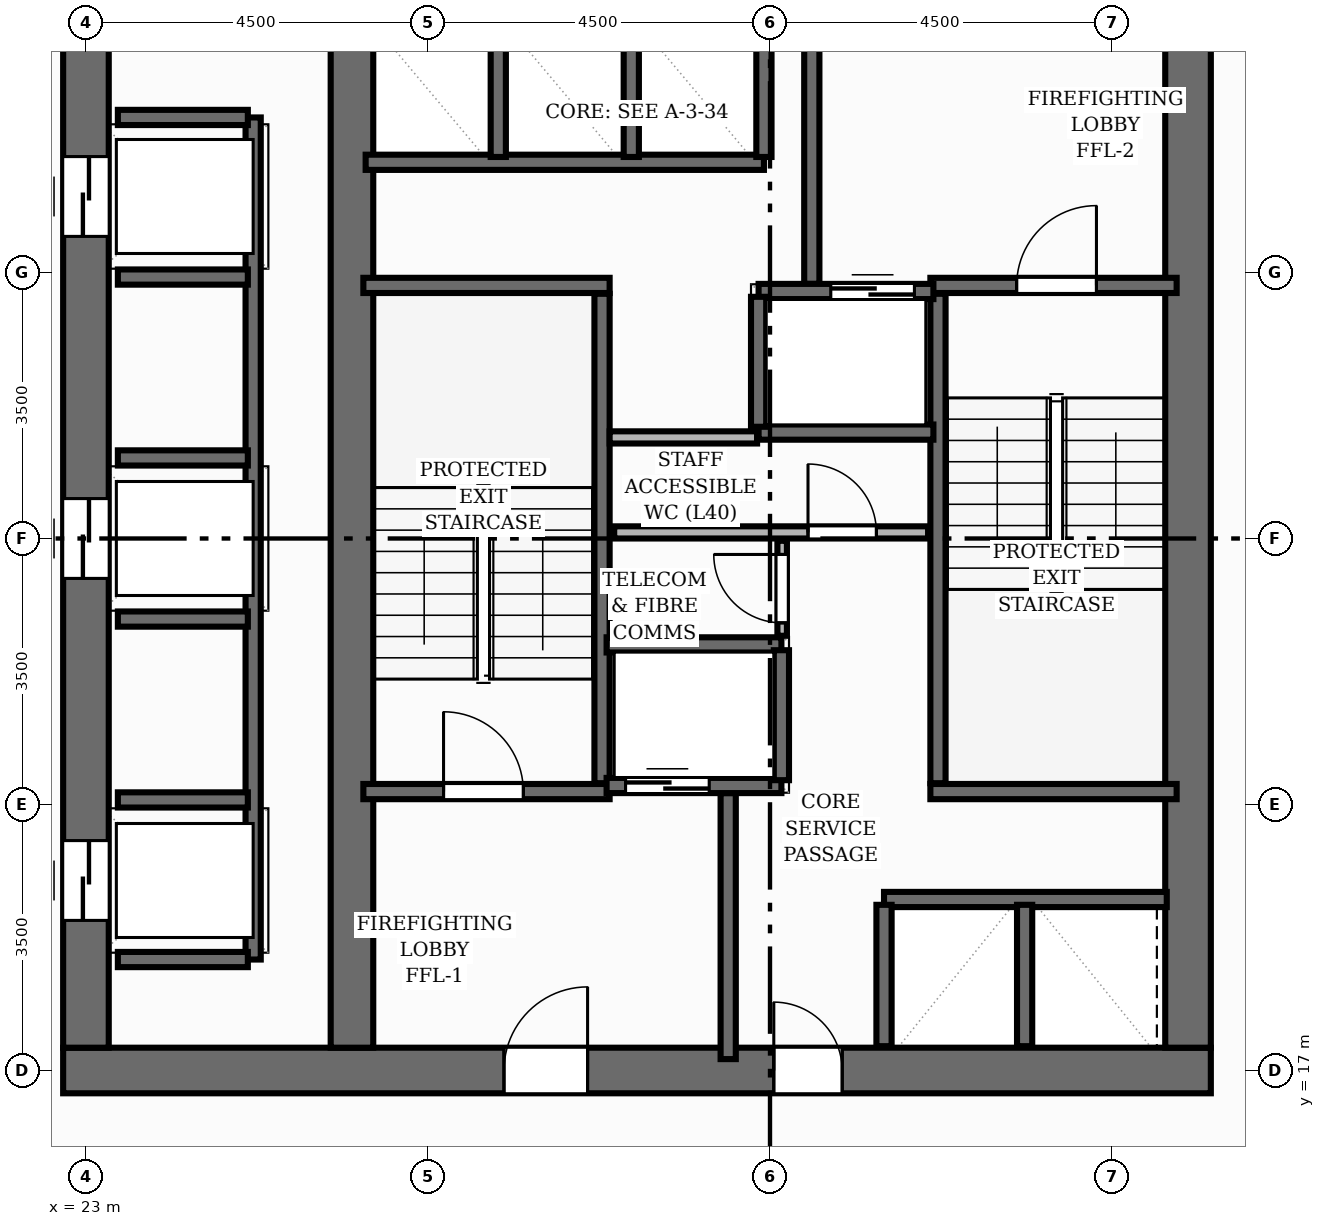
"""IFC4 building model, lengths in metres.
Left out: names, types, materials, properties, quantities, classifications, styles, units other than length and angle.
Written with IfcOpenShell. Run it as: python <this file> out.ifc"""

import sys

from ifc_helpers import new_model, si_unit, direction, frame, frame_2d, origin, place, context, subcontext, project, spatial, rectangle, extrude, element, fill, save


model = new_model("IFC4")
c1 = context("Model", 3, precision=1e-05, world=origin(), true_north=direction((0.0, 1.0)))
c2 = subcontext(c1, "Body", "Model", "MODEL_VIEW")
j1 = project(units=[si_unit("LENGTHUNIT", "METRE"), si_unit("PLANEANGLEUNIT", "RADIAN")], contexts=[c1])
p1 = place(None, origin())
s1 = spatial("IfcSite", under=j1, at=p1, CompositionType="ELEMENT")
p2 = place(p1, origin())
s2 = spatial("IfcBuilding", under=s1, at=p2, CompositionType="ELEMENT")
p3 = place(p2, frame((0.0, 0.0, 136.16)))
s3 = spatial("IfcBuildingStorey", under=s2, at=p3, CompositionType="ELEMENT", Elevation=136.16)
p4 = place(p3, frame((22.7, 17.0, 0.0), z_axis=(0.0, 0.0, 1.0), x_axis=(1.0, 0.0, 0.0)))
e1 = element("IfcWall", 1, at=p4, inside=s3, PredefinedType="SHEAR", context=c2, shape_type="SweptSolid", body=[
    extrude(rectangle(XDim=15.1, YDim=0.6, at=frame_2d((7.55, 0.0))), origin(), (0.0, 0.0, 1.0), 3.2),
])
p5 = place(p4, frame((5.8, 0.0, 0.0)))
e2 = element("IfcOpeningElement", 2, at=p5, cuts=e1, PredefinedType="OPENING", context=c2, shape_type="SweptSolid", body=[
    extrude(rectangle(XDim=1.1, YDim=2.15, at=frame_2d((0.55, 1.075))), frame((0.0, 0.31, 0.0), z_axis=(0.0, -1.0, 0.0), x_axis=(1.0, 0.0, 0.0)), (0.0, 0.0, 1.0), 0.62),
])
p6 = place(p4, frame((9.35, 0.0, 0.0)))
e3 = element("IfcOpeningElement", 3, at=p6, cuts=e1, PredefinedType="OPENING", context=c2, shape_type="SweptSolid", body=[
    extrude(rectangle(XDim=0.9, YDim=2.1, at=frame_2d((0.45, 1.05))), frame((0.0, 0.31, 0.0), z_axis=(0.0, -1.0, 0.0), x_axis=(1.0, 0.0, 0.0)), (0.0, 0.0, 1.0), 0.62),
])
p7 = place(p3, frame((23.0, 17.3, 0.0), z_axis=(0.0, 0.0, 1.0), x_axis=(0.0, 1.0, 0.0)))
e4 = element("IfcWall", 4, at=p7, inside=s3, PredefinedType="SHEAR", context=c2, shape_type="SweptSolid", body=[
    extrude(rectangle(XDim=13.4, YDim=0.6, at=frame_2d((6.7, 0.0))), origin(), (0.0, 0.0, 1.0), 3.2),
])
p8 = place(p7, frame((1.675, 0.0, 0.0)))
e5 = element("IfcOpeningElement", 5, at=p8, cuts=e4, PredefinedType="OPENING", context=c2, shape_type="SweptSolid", body=[
    extrude(rectangle(XDim=1.05, YDim=2.15, at=frame_2d((0.525, 1.075))), frame((0.0, 0.31, 0.0), z_axis=(0.0, -1.0, 0.0), x_axis=(1.0, 0.0, 0.0)), (0.0, 0.0, 1.0), 0.62),
])
p9 = place(p7, frame((6.175, 0.0, 0.0)))
e6 = element("IfcOpeningElement", 6, at=p9, cuts=e4, PredefinedType="OPENING", context=c2, shape_type="SweptSolid", body=[
    extrude(rectangle(XDim=1.05, YDim=2.15, at=frame_2d((0.525, 1.075))), frame((0.0, 0.31, 0.0), z_axis=(0.0, -1.0, 0.0), x_axis=(1.0, 0.0, 0.0)), (0.0, 0.0, 1.0), 0.62),
])
p10 = place(p7, frame((10.675, 0.0, 0.0)))
e7 = element("IfcOpeningElement", 7, at=p10, cuts=e4, PredefinedType="OPENING", context=c2, shape_type="SweptSolid", body=[
    extrude(rectangle(XDim=1.05, YDim=2.15, at=frame_2d((0.525, 1.075))), frame((0.0, 0.31, 0.0), z_axis=(0.0, -1.0, 0.0), x_axis=(1.0, 0.0, 0.0)), (0.0, 0.0, 1.0), 0.62),
])
p11 = place(p3, frame((37.5, 17.3, 0.0), z_axis=(0.0, 0.0, 1.0), x_axis=(0.0, 1.0, 0.0)))
e8 = element("IfcWall", 8, at=p11, inside=s3, PredefinedType="SHEAR", context=c2, shape_type="SweptSolid", body=[
    extrude(rectangle(XDim=13.4, YDim=0.6, at=frame_2d((6.7, 0.0))), origin(), (0.0, 0.0, 1.0), 3.2),
])
p12 = place(p3, frame((26.5, 17.3, 0.0), z_axis=(0.0, 0.0, 1.0), x_axis=(0.0, 1.0, 0.0)))
e9 = element("IfcWall", 9, at=p12, inside=s3, PredefinedType="SHEAR", context=c2, shape_type="SweptSolid", body=[
    extrude(rectangle(XDim=13.4, YDim=0.56, at=frame_2d((6.7, 0.0))), origin(), (0.0, 0.0, 1.0), 3.2),
])
p13 = place(p3, frame((29.79, 20.78, 0.0), z_axis=(0.0, 0.0, 1.0), x_axis=(0.0, 1.0, 0.0)))
e10 = element("IfcWall", 10, at=p13, inside=s3, PredefinedType="SHEAR", context=c2, shape_type="SweptSolid", body=[
    extrude(rectangle(XDim=6.44, YDim=0.2, at=frame_2d((3.22, 0.0))), origin(), (0.0, 0.0, 1.0), 3.2),
])
p14 = place(p3, frame((26.65, 27.33, 0.0), z_axis=(0.0, 0.0, 1.0), x_axis=(1.0, 0.0, 0.0)))
e11 = element("IfcWall", 11, at=p14, inside=s3, PredefinedType="SHEAR", context=c2, shape_type="SweptSolid", body=[
    extrude(rectangle(XDim=3.24, YDim=0.2, at=frame_2d((1.62, 0.0))), origin(), (0.0, 0.0, 1.0), 3.2),
])
p15 = place(p3, frame((26.65, 20.67, 0.0), z_axis=(0.0, 0.0, 1.0), x_axis=(1.0, 0.0, 0.0)))
e12 = element("IfcWall", 12, at=p15, inside=s3, PredefinedType="SHEAR", context=c2, shape_type="SweptSolid", body=[
    extrude(rectangle(XDim=3.24, YDim=0.2, at=frame_2d((1.62, 0.0))), origin(), (0.0, 0.0, 1.0), 3.2),
])
p16 = place(p15, frame((1.055, 0.0, 0.0)))
e13 = element("IfcOpeningElement", 13, at=p16, cuts=e12, PredefinedType="OPENING", context=c2, shape_type="SweptSolid", body=[
    extrude(rectangle(XDim=1.05, YDim=2.15, at=frame_2d((0.525, 1.075))), frame((0.0, 0.11, 0.0), z_axis=(0.0, -1.0, 0.0), x_axis=(1.0, 0.0, 0.0)), (0.0, 0.0, 1.0), 0.22),
])
p17 = place(p3, frame((34.21, 20.78, 0.0), z_axis=(0.0, 0.0, 1.0), x_axis=(0.0, 1.0, 0.0)))
e14 = element("IfcWall", 14, at=p17, inside=s3, PredefinedType="SHEAR", context=c2, shape_type="SweptSolid", body=[
    extrude(rectangle(XDim=6.44, YDim=0.2, at=frame_2d((3.22, 0.0))), origin(), (0.0, 0.0, 1.0), 3.2),
])
p18 = place(p3, frame((34.11, 20.67, 0.0), z_axis=(0.0, 0.0, 1.0), x_axis=(1.0, 0.0, 0.0)))
e15 = element("IfcWall", 15, at=p18, inside=s3, PredefinedType="SHEAR", context=c2, shape_type="SweptSolid", body=[
    extrude(rectangle(XDim=3.24, YDim=0.2, at=frame_2d((1.62, 0.0))), origin(), (0.0, 0.0, 1.0), 3.2),
])
p19 = place(p3, frame((34.11, 27.33, 0.0), z_axis=(0.0, 0.0, 1.0), x_axis=(1.0, 0.0, 0.0)))
e16 = element("IfcWall", 16, at=p19, inside=s3, PredefinedType="SHEAR", context=c2, shape_type="SweptSolid", body=[
    extrude(rectangle(XDim=3.24, YDim=0.2, at=frame_2d((1.62, 0.0))), origin(), (0.0, 0.0, 1.0), 3.2),
])
p20 = place(p19, frame((1.135, 0.0, 0.0)))
e17 = element("IfcOpeningElement", 17, at=p20, cuts=e16, PredefinedType="OPENING", context=c2, shape_type="SweptSolid", body=[
    extrude(rectangle(XDim=1.05, YDim=2.15, at=frame_2d((0.525, 1.075))), frame((0.0, 0.11, 0.0), z_axis=(0.0, -1.0, 0.0), x_axis=(1.0, 0.0, 0.0)), (0.0, 0.0, 1.0), 0.22),
])
for number, where, z_axis, x_axis in (
    (18, (31.45, 17.15, 0.0), (0.0, 0.0, 1.0), (0.0, 1.0, 0.0)),
    (19, (32.55, 27.35, 0.0), (0.0, 0.0, 1.0), (0.0, 1.0, 0.0)),
):
    element("IfcWall", number, at=place(p3, frame(where, z_axis=z_axis, x_axis=x_axis)), inside=s3, PredefinedType="SHEAR", context=c2, shape_type="SweptSolid", body=[
        extrude(rectangle(XDim=3.5, YDim=0.2, at=frame_2d((1.75, 0.0))), origin(), (0.0, 0.0, 1.0), 3.2),
    ])
p21 = place(p3, frame((29.85, 20.75, 0.0), z_axis=(0.0, 0.0, 1.0), x_axis=(1.0, 0.0, 0.0)))
e20 = element("IfcWall", 20, at=p21, inside=s3, PredefinedType="SHEAR", context=c2, shape_type="SweptSolid", body=[
    extrude(rectangle(XDim=2.3, YDim=0.2, at=frame_2d((1.15, 0.0))), origin(), (0.0, 0.0, 1.0), 3.2),
])
p22 = place(p21, frame((0.25, 0.0, 0.0)))
e21 = element("IfcOpeningElement", 21, at=p22, cuts=e20, PredefinedType="OPENING", context=c2, shape_type="SweptSolid", body=[
    extrude(rectangle(XDim=1.1, YDim=2.15, at=frame_2d((0.55, 1.075))), frame((0.0, 0.11, 0.0), z_axis=(0.0, -1.0, 0.0), x_axis=(1.0, 0.0, 0.0)), (0.0, 0.0, 1.0), 0.22),
])
p23 = place(p3, frame((29.85, 22.6, 0.0), z_axis=(0.0, 0.0, 1.0), x_axis=(1.0, 0.0, 0.0)))
e22 = element("IfcWall", 22, at=p23, inside=s3, PredefinedType="SHEAR", context=c2, shape_type="SweptSolid", body=[
    extrude(rectangle(XDim=2.3, YDim=0.2, at=frame_2d((1.15, 0.0))), origin(), (0.0, 0.0, 1.0), 3.2),
])
p24 = place(p3, frame((32.15, 20.82, 0.0), z_axis=(0.0, 0.0, 1.0), x_axis=(0.0, 1.0, 0.0)))
e23 = element("IfcWall", 23, at=p24, inside=s3, PredefinedType="SHEAR", context=c2, shape_type="SweptSolid", body=[
    extrude(rectangle(XDim=1.71, YDim=0.2, at=frame_2d((0.855, 0.0))), origin(), (0.0, 0.0, 1.0), 3.2),
])
p25 = place(p3, frame((31.85, 27.25, 0.0), z_axis=(0.0, 0.0, 1.0), x_axis=(1.0, 0.0, 0.0)))
e24 = element("IfcWall", 24, at=p25, inside=s3, PredefinedType="SHEAR", context=c2, shape_type="SweptSolid", body=[
    extrude(rectangle(XDim=2.3, YDim=0.2, at=frame_2d((1.15, 0.0))), origin(), (0.0, 0.0, 1.0), 3.2),
])
p26 = place(p25, frame((0.95, 0.0, 0.0)))
e25 = element("IfcOpeningElement", 25, at=p26, cuts=e24, PredefinedType="OPENING", context=c2, shape_type="SweptSolid", body=[
    extrude(rectangle(XDim=1.1, YDim=2.15, at=frame_2d((0.55, 1.075))), frame((0.0, 0.11, 0.0), z_axis=(0.0, -1.0, 0.0), x_axis=(1.0, 0.0, 0.0)), (0.0, 0.0, 1.0), 0.22),
])
p27 = place(p3, frame((31.85, 25.4, 0.0), z_axis=(0.0, 0.0, 1.0), x_axis=(1.0, 0.0, 0.0)))
e26 = element("IfcWall", 26, at=p27, inside=s3, PredefinedType="SHEAR", context=c2, shape_type="SweptSolid", body=[
    extrude(rectangle(XDim=2.3, YDim=0.2, at=frame_2d((1.15, 0.0))), origin(), (0.0, 0.0, 1.0), 3.2),
])
p28 = place(p3, frame((31.85, 25.47, 0.0), z_axis=(0.0, 0.0, 1.0), x_axis=(0.0, 1.0, 0.0)))
e27 = element("IfcWall", 27, at=p28, inside=s3, PredefinedType="SHEAR", context=c2, shape_type="SweptSolid", body=[
    extrude(rectangle(XDim=1.71, YDim=0.2, at=frame_2d((0.855, 0.0))), origin(), (0.0, 0.0, 1.0), 3.2),
])
p29 = place(p3, frame((25.2, 18.46, 0.0), z_axis=(0.0, 0.0, 1.0), x_axis=(0.0, 1.0, 0.0)))
e28 = element("IfcWall", 28, at=p29, inside=s3, PredefinedType="SHEAR", context=c2, shape_type="SweptSolid", body=[
    extrude(rectangle(XDim=11.08, YDim=0.2, at=frame_2d((5.54, 0.0))), origin(), (0.0, 0.0, 1.0), 3.2),
])
for number, where, z_axis, x_axis in (
    (29, (23.42, 18.46, 0.0), (0.0, 0.0, 1.0), (1.0, 0.0, 0.0)),
    (30, (23.42, 29.54, 0.0), (0.0, 0.0, 1.0), (1.0, 0.0, 0.0)),
    (31, (23.42, 20.56, 0.0), (0.0, 0.0, 1.0), (1.0, 0.0, 0.0)),
    (32, (23.42, 22.94, 0.0), (0.0, 0.0, 1.0), (1.0, 0.0, 0.0)),
    (33, (23.42, 25.06, 0.0), (0.0, 0.0, 1.0), (1.0, 0.0, 0.0)),
    (34, (23.42, 27.44, 0.0), (0.0, 0.0, 1.0), (1.0, 0.0, 0.0)),
):
    element("IfcWall", number, at=place(p3, frame(where, z_axis=z_axis, x_axis=x_axis)), inside=s3, PredefinedType="SHEAR", context=c2, shape_type="SweptSolid", body=[
        extrude(rectangle(XDim=1.71, YDim=0.2, at=frame_2d((0.855, 0.0))), origin(), (0.0, 0.0, 1.0), 3.2),
    ])
p30 = place(p3, frame((26.68, 28.95, 0.0), z_axis=(0.0, 0.0, 1.0), x_axis=(1.0, 0.0, 0.0)))
e35 = element("IfcWall", 35, at=p30, inside=s3, PredefinedType="SHEAR", context=c2, shape_type="SweptSolid", body=[
    extrude(rectangle(XDim=5.24, YDim=0.2, at=frame_2d((2.62, 0.0))), origin(), (0.0, 0.0, 1.0), 3.2),
])
for number, where, z_axis, x_axis in (
    (36, (31.92, 29.02, 0.0), (0.0, 0.0, 1.0), (0.0, 1.0, 0.0)),
    (37, (28.425, 29.02, 0.0), (0.0, 0.0, 1.0), (0.0, 1.0, 0.0)),
    (38, (30.175, 29.02, 0.0), (0.0, 0.0, 1.0), (0.0, 1.0, 0.0)),
):
    element("IfcWall", number, at=place(p3, frame(where, z_axis=z_axis, x_axis=x_axis)), inside=s3, PredefinedType="SHEAR", context=c2, shape_type="SweptSolid", body=[
        extrude(rectangle(XDim=1.66, YDim=0.2, at=frame_2d((0.83, 0.0))), origin(), (0.0, 0.0, 1.0), 3.2),
    ])
p31 = place(p3, frame((33.5, 19.25, 0.0), z_axis=(0.0, 0.0, 1.0), x_axis=(1.0, 0.0, 0.0)))
e39 = element("IfcWall", 39, at=p31, inside=s3, PredefinedType="SHEAR", context=c2, shape_type="SweptSolid", body=[
    extrude(rectangle(XDim=3.72, YDim=0.2, at=frame_2d((1.86, 0.0))), origin(), (0.0, 0.0, 1.0), 3.2),
])
for number, where, z_axis, x_axis in (
    (40, (33.5, 17.32, 0.0), (0.0, 0.0, 1.0), (0.0, 1.0, 0.0)),
    (41, (35.35, 17.32, 0.0), (0.0, 0.0, 1.0), (0.0, 1.0, 0.0)),
):
    element("IfcWall", number, at=place(p3, frame(where, z_axis=z_axis, x_axis=x_axis)), inside=s3, PredefinedType="SHEAR", context=c2, shape_type="SweptSolid", body=[
        extrude(rectangle(XDim=1.86, YDim=0.2, at=frame_2d((0.93, 0.0))), origin(), (0.0, 0.0, 1.0), 3.2),
    ])
p32 = place(p3, frame((29.95, 24.08, 0.0), z_axis=(0.0, 0.0, 1.0), x_axis=(1.0, 0.0, 0.0)))
e42 = element("IfcWall", 42, at=p32, inside=s3, PredefinedType="PLUMBINGWALL", context=c2, shape_type="SweptSolid", body=[
    extrude(rectangle(XDim=4.13, YDim=0.16, at=frame_2d((2.065, 0.0))), origin(), (0.0, 0.0, 1.0), 2.955),
])
p33 = place(p32, frame((2.55, 0.0, 0.0)))
e43 = element("IfcOpeningElement", 43, at=p33, cuts=e42, PredefinedType="OPENING", context=c2, shape_type="SweptSolid", body=[
    extrude(rectangle(XDim=0.9, YDim=2.1, at=frame_2d((0.45, 1.05))), frame((0.0, 0.09, 0.0), z_axis=(0.0, -1.0, 0.0), x_axis=(1.0, 0.0, 0.0)), (0.0, 0.0, 1.0), 0.18),
])
p34 = place(p3, frame((32.16, 22.72, 0.0), z_axis=(0.0, 0.0, 1.0), x_axis=(0.0, 1.0, 0.0)))
e44 = element("IfcWall", 44, at=p34, inside=s3, PredefinedType="PARTITIONING", context=c2, shape_type="SweptSolid", body=[
    extrude(rectangle(XDim=1.25, YDim=0.125, at=frame_2d((0.625, 0.0))), origin(), (0.0, 0.0, 1.0), 2.955),
])
p35 = place(p34, frame((0.17, 0.0, 0.0)))
e45 = element("IfcOpeningElement", 45, at=p35, cuts=e44, PredefinedType="OPENING", context=c2, shape_type="SweptSolid", body=[
    extrude(rectangle(XDim=0.9, YDim=2.1, at=frame_2d((0.45, 1.05))), frame((0.0, 0.073, 0.0), z_axis=(0.0, -1.0, 0.0), x_axis=(1.0, 0.0, 0.0)), (0.0, 0.0, 1.0), 0.145),
])
p36 = place(p3, frame((29.89, 25.33, 0.0), z_axis=(0.0, 0.0, 1.0), x_axis=(1.0, 0.0, 0.0)))
e46 = element("IfcWall", 46, at=p36, inside=s3, PredefinedType="PLUMBINGWALL", context=c2, shape_type="SweptSolid", body=[
    extrude(rectangle(XDim=1.94, YDim=0.16, at=frame_2d((0.97, 0.0))), origin(), (0.0, 0.0, 1.0), 2.955),
])
p37 = place(p16, origin())
e47 = element("IfcDoor", 47, at=p37, inside=s3, OperationType="SINGLE_SWING_LEFT", PredefinedType="DOOR", context=c2, shape_type="SweptSolid", body=[
    extrude(rectangle(XDim=1.05, YDim=2.15, at=frame_2d((0.525, 1.075))), frame((0.0, 0.025, 0.0), z_axis=(0.0, -1.0, 0.0), x_axis=(1.0, 0.0, 0.0)), (0.0, 0.0, 1.0), 0.05),
])
fill(e13, e47)
p38 = place(p20, origin())
e48 = element("IfcDoor", 48, at=p38, inside=s3, OperationType="SINGLE_SWING_RIGHT", PredefinedType="DOOR", context=c2, shape_type="SweptSolid", body=[
    extrude(rectangle(XDim=1.05, YDim=2.15, at=frame_2d((0.525, 1.075))), frame((0.0, 0.025, 0.0), z_axis=(0.0, -1.0, 0.0), x_axis=(1.0, 0.0, 0.0)), (0.0, 0.0, 1.0), 0.05),
])
fill(e17, e48)
p39 = place(p5, origin())
e49 = element("IfcDoor", 49, at=p39, inside=s3, OperationType="SINGLE_SWING_RIGHT", PredefinedType="DOOR", context=c2, shape_type="SweptSolid", body=[
    extrude(rectangle(XDim=1.1, YDim=2.15, at=frame_2d((0.55, 1.075))), frame((0.0, 0.025, 0.0), z_axis=(0.0, -1.0, 0.0), x_axis=(1.0, 0.0, 0.0)), (0.0, 0.0, 1.0), 0.05),
])
fill(e2, e49)
p40 = place(p22, origin())
e50 = element("IfcDoor", 50, at=p40, inside=s3, OperationType="DOUBLE_DOOR_SLIDING", PredefinedType="DOOR", context=c2, shape_type="SweptSolid", body=[
    extrude(rectangle(XDim=1.1, YDim=2.15, at=frame_2d((0.55, 1.075))), frame((0.0, 0.025, 0.0), z_axis=(0.0, -1.0, 0.0), x_axis=(1.0, 0.0, 0.0)), (0.0, 0.0, 1.0), 0.05),
])
fill(e21, e50)
p41 = place(p26, origin())
e51 = element("IfcDoor", 51, at=p41, inside=s3, OperationType="DOUBLE_DOOR_SLIDING", PredefinedType="DOOR", context=c2, shape_type="SweptSolid", body=[
    extrude(rectangle(XDim=1.1, YDim=2.15, at=frame_2d((0.55, 1.075))), frame((0.0, 0.025, 0.0), z_axis=(0.0, -1.0, 0.0), x_axis=(1.0, 0.0, 0.0)), (0.0, 0.0, 1.0), 0.05),
])
fill(e25, e51)
p42 = place(p8, origin())
e52 = element("IfcDoor", 52, at=p42, inside=s3, OperationType="DOUBLE_DOOR_SLIDING", PredefinedType="DOOR", context=c2, shape_type="SweptSolid", body=[
    extrude(rectangle(XDim=1.05, YDim=2.15, at=frame_2d((0.525, 1.075))), frame((0.0, 0.025, 0.0), z_axis=(0.0, -1.0, 0.0), x_axis=(1.0, 0.0, 0.0)), (0.0, 0.0, 1.0), 0.05),
])
fill(e5, e52)
p43 = place(p9, origin())
e53 = element("IfcDoor", 53, at=p43, inside=s3, OperationType="DOUBLE_DOOR_SLIDING", PredefinedType="DOOR", context=c2, shape_type="SweptSolid", body=[
    extrude(rectangle(XDim=1.05, YDim=2.15, at=frame_2d((0.525, 1.075))), frame((0.0, 0.025, 0.0), z_axis=(0.0, -1.0, 0.0), x_axis=(1.0, 0.0, 0.0)), (0.0, 0.0, 1.0), 0.05),
])
fill(e6, e53)
p44 = place(p10, origin())
e54 = element("IfcDoor", 54, at=p44, inside=s3, OperationType="DOUBLE_DOOR_SLIDING", PredefinedType="DOOR", context=c2, shape_type="SweptSolid", body=[
    extrude(rectangle(XDim=1.05, YDim=2.15, at=frame_2d((0.525, 1.075))), frame((0.0, 0.025, 0.0), z_axis=(0.0, -1.0, 0.0), x_axis=(1.0, 0.0, 0.0)), (0.0, 0.0, 1.0), 0.05),
])
fill(e7, e54)
p45 = place(p6, origin())
e55 = element("IfcDoor", 55, at=p45, inside=s3, OperationType="SINGLE_SWING_LEFT", PredefinedType="DOOR", context=c2, shape_type="SweptSolid", body=[
    extrude(rectangle(XDim=0.9, YDim=2.1, at=frame_2d((0.45, 1.05))), frame((0.0, 0.025, 0.0), z_axis=(0.0, -1.0, 0.0), x_axis=(1.0, 0.0, 0.0)), (0.0, 0.0, 1.0), 0.05),
])
fill(e3, e55)
p46 = place(p33, origin())
e56 = element("IfcDoor", 56, at=p46, inside=s3, OperationType="SINGLE_SWING_LEFT", PredefinedType="DOOR", context=c2, shape_type="SweptSolid", body=[
    extrude(rectangle(XDim=0.9, YDim=2.1, at=frame_2d((0.45, 1.05))), frame((0.0, 0.025, 0.0), z_axis=(0.0, -1.0, 0.0), x_axis=(1.0, 0.0, 0.0)), (0.0, 0.0, 1.0), 0.05),
])
fill(e43, e56)
p47 = place(p35, origin())
e57 = element("IfcDoor", 57, at=p47, inside=s3, OperationType="SINGLE_SWING_RIGHT", PredefinedType="DOOR", context=c2, shape_type="SweptSolid", body=[
    extrude(rectangle(XDim=0.9, YDim=2.1, at=frame_2d((0.45, 1.05))), frame((0.0, 0.025, 0.0), z_axis=(0.0, -1.0, 0.0), x_axis=(1.0, 0.0, 0.0)), (0.0, 0.0, 1.0), 0.05),
])
fill(e45, e57)
save(model, sys.argv[1])
